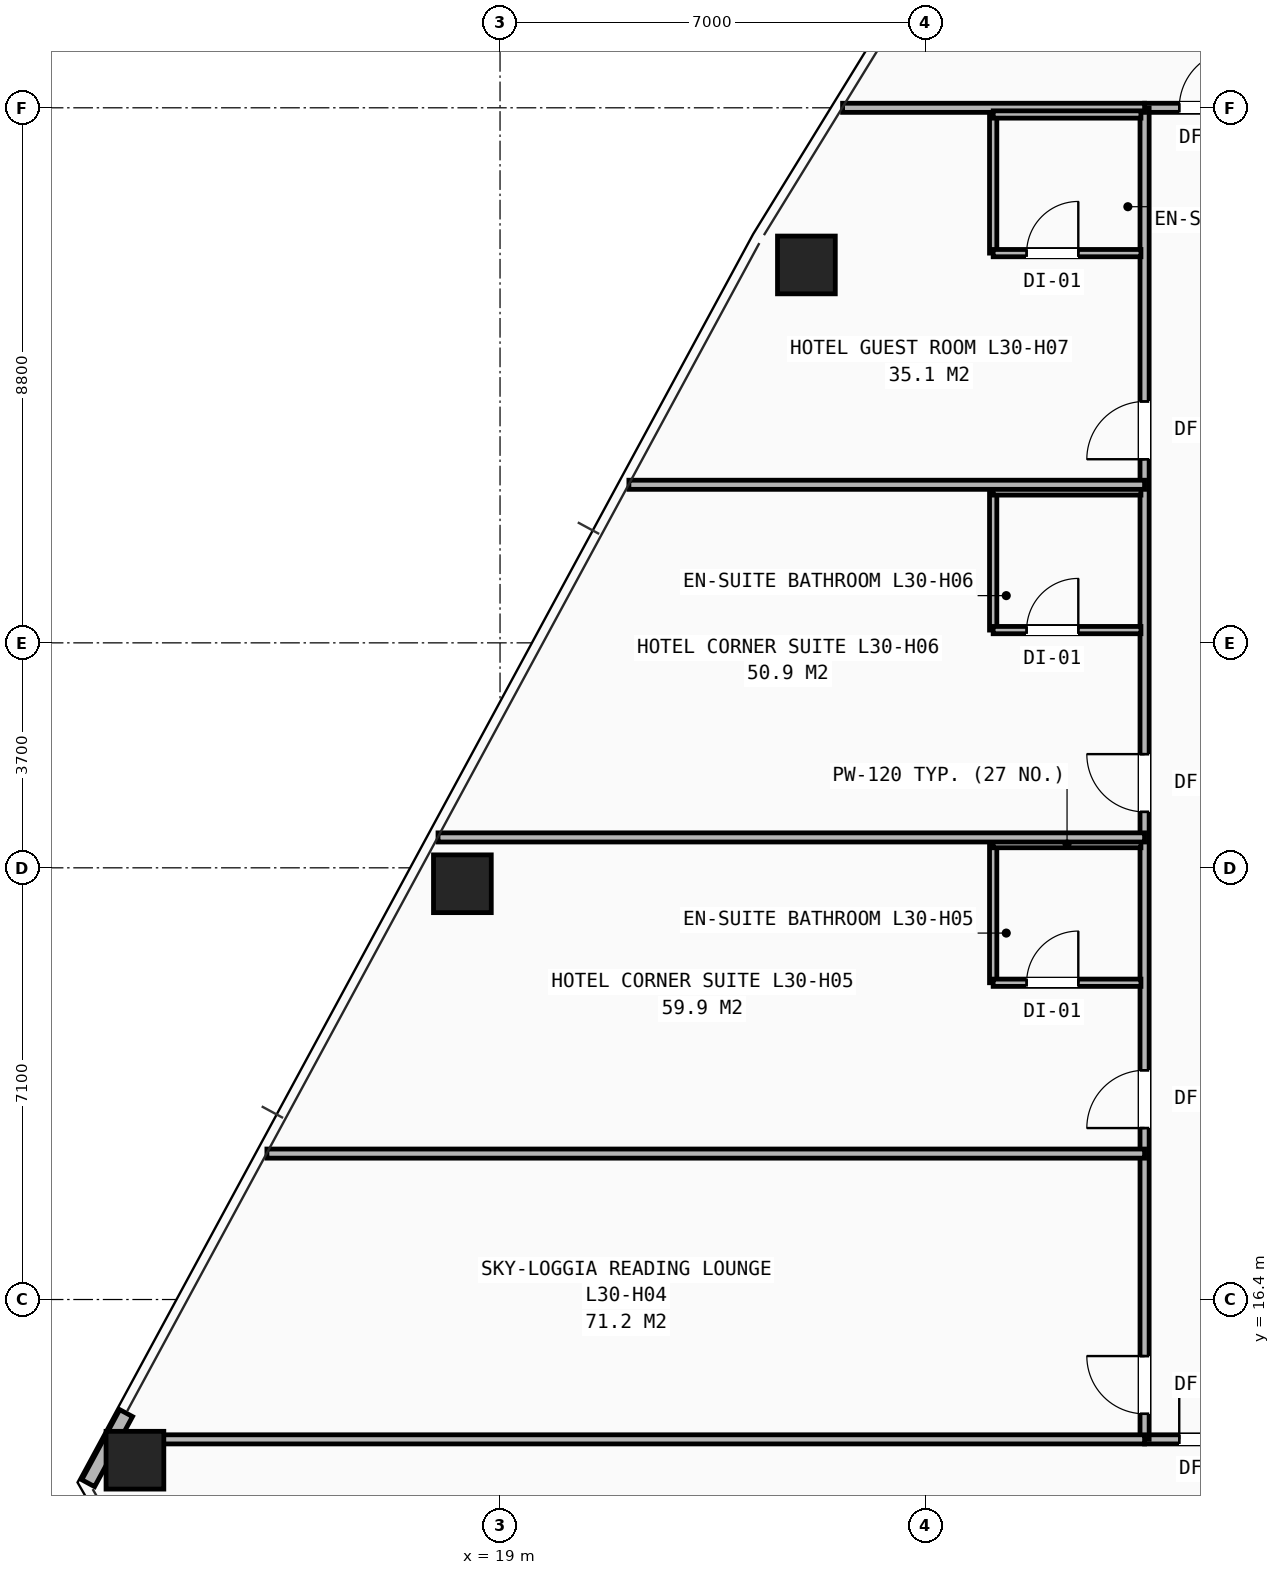
"""IFC4 building model, lengths in metres.
Left out: names, types, materials, properties, quantities, classifications, styles, units other than length and angle.
Written with IfcOpenShell. Run it as: python <this file> out.ifc"""

import sys

from ifc_helpers import new_model, si_unit, direction, frame, frame_2d, origin, origin_2d, place, context, subcontext, project, spatial, rectangle, hollow_rectangle, extrude, element, fill, save


model = new_model("IFC4")
c1 = context("Model", 3, precision=1e-05, world=origin(), true_north=direction((0.0, 1.0)))
c2 = subcontext(c1, "Body", "Model", "MODEL_VIEW")
j1 = project(units=[si_unit("LENGTHUNIT", "METRE"), si_unit("PLANEANGLEUNIT", "RADIAN")], contexts=[c1])
p1 = place(None, origin())
s1 = spatial("IfcSite", under=j1, at=p1, CompositionType="ELEMENT")
p2 = place(p1, origin())
s2 = spatial("IfcBuilding", under=s1, at=p2, CompositionType="ELEMENT")
p3 = place(p2, frame((0.0, 0.0, 105.4)))
s3 = spatial("IfcBuildingStorey", under=s2, at=p3, CompositionType="ELEMENT", Elevation=105.4)
for number, where, z_axis, x_axis in (
    (1, (24.038, 33.416, 0.0), (0.0, 0.0, 1.0), (1.0, 0.0, 0.0)),
    (2, (18.381, 23.238, 0.0), (0.0, 0.0, 1.0), (1.0, 0.0, 0.0)),
    (3, (12.996, 13.757, 0.0), (0.0, 0.0, 1.0), (1.0, 0.0, 0.0)),
):
    element("IfcColumn", number, at=place(p3, frame(where, z_axis=z_axis, x_axis=x_axis)), inside=s3, PredefinedType="COLUMN", context=c2, shape_type="SweptSolid", body=[
        extrude(hollow_rectangle(XDim=0.95, YDim=0.95, WallThickness=0.065, at=origin_2d()), origin(), (0.0, 0.0, 1.0), 3.2),
    ])
p4 = place(p3, frame((12.85, 14.532, 0.0), z_axis=(0.0, 0.0, 1.0), x_axis=(-0.475820948293, -0.879542167929, 0.0)))
e4 = element("IfcWall", 4, at=p4, inside=s3, PredefinedType="SHEAR", context=c2, shape_type="SweptSolid", body=[
    extrude(rectangle(XDim=1.311, YDim=0.24, at=frame_2d((0.655, 0.0))), origin(), (0.0, 0.0, 1.0), 2.253),
])
p5 = place(p3, frame((29.6, 14.1, 0.0), z_axis=(0.0, 0.0, 1.0), x_axis=(1.0, 0.0, 0.0)))
e5 = element("IfcWall", 5, at=p5, inside=s3, PredefinedType="PARTITIONING", context=c2, shape_type="SweptSolid", body=[
    extrude(rectangle(XDim=20.8, YDim=0.15, at=frame_2d((10.4, 0.0))), origin(), (0.0, 0.0, 1.0), 2.421),
])
p6 = place(p5, frame((0.57, 0.0, 0.0)))
e6 = element("IfcOpeningElement", 6, at=p6, cuts=e5, PredefinedType="OPENING", context=c2, shape_type="SweptSolid", body=[
    extrude(rectangle(XDim=0.95, YDim=2.1, at=frame_2d((0.475, 1.05))), frame((0.0, 0.085, 0.0), z_axis=(0.0, -1.0, 0.0), x_axis=(1.0, 0.0, 0.0)), (0.0, 0.0, 1.0), 0.17),
])
p7 = place(p5, frame((13.02, 0.0, 0.0)))
e7 = element("IfcOpeningElement", 7, at=p7, cuts=e5, PredefinedType="OPENING", context=c2, shape_type="SweptSolid", body=[
    extrude(rectangle(XDim=0.95, YDim=2.1, at=frame_2d((0.475, 1.05))), frame((0.0, 0.085, 0.0), z_axis=(0.0, -1.0, 0.0), x_axis=(1.0, 0.0, 0.0)), (0.0, 0.0, 1.0), 0.17),
])
p8 = place(p5, frame((17.42, 0.0, 0.0)))
e8 = element("IfcOpeningElement", 8, at=p8, cuts=e5, PredefinedType="OPENING", context=c2, shape_type="SweptSolid", body=[
    extrude(rectangle(XDim=0.95, YDim=2.1, at=frame_2d((0.475, 1.05))), frame((0.0, 0.085, 0.0), z_axis=(0.0, -1.0, 0.0), x_axis=(1.0, 0.0, 0.0)), (0.0, 0.0, 1.0), 0.17),
])
p9 = place(p3, frame((29.6, 36.0, 0.0), z_axis=(0.0, 0.0, 1.0), x_axis=(1.0, 0.0, 0.0)))
e9 = element("IfcWall", 9, at=p9, inside=s3, PredefinedType="PARTITIONING", context=c2, shape_type="SweptSolid", body=[
    extrude(rectangle(XDim=9.65, YDim=0.15, at=frame_2d((4.825, 0.0))), origin(), (0.0, 0.0, 1.0), 2.503),
])
p10 = place(p9, frame((0.57, 0.0, 0.0)))
e10 = element("IfcOpeningElement", 10, at=p10, cuts=e9, PredefinedType="OPENING", context=c2, shape_type="SweptSolid", body=[
    extrude(rectangle(XDim=0.95, YDim=2.1, at=frame_2d((0.475, 1.05))), frame((0.0, 0.085, 0.0), z_axis=(0.0, -1.0, 0.0), x_axis=(1.0, 0.0, 0.0)), (0.0, 0.0, 1.0), 0.17),
])
p11 = place(p9, frame((7.32, 0.0, 0.0)))
e11 = element("IfcOpeningElement", 11, at=p11, cuts=e9, PredefinedType="OPENING", context=c2, shape_type="SweptSolid", body=[
    extrude(rectangle(XDim=0.95, YDim=2.1, at=frame_2d((0.475, 1.05))), frame((0.0, 0.085, 0.0), z_axis=(0.0, -1.0, 0.0), x_axis=(1.0, 0.0, 0.0)), (0.0, 0.0, 1.0), 0.17),
])
p12 = place(p3, frame((29.6, 14.1, 0.0), z_axis=(0.0, 0.0, 1.0), x_axis=(0.0, 1.0, 0.0)))
e12 = element("IfcWall", 12, at=p12, inside=s3, PredefinedType="PARTITIONING", context=c2, shape_type="SweptSolid", body=[
    extrude(rectangle(XDim=21.9, YDim=0.15, at=frame_2d((10.95, 0.0))), origin(), (0.0, 0.0, 1.0), 2.421),
])
p13 = place(p12, frame((0.42, 0.0, 0.0)))
e13 = element("IfcOpeningElement", 13, at=p13, cuts=e12, PredefinedType="OPENING", context=c2, shape_type="SweptSolid", body=[
    extrude(rectangle(XDim=0.95, YDim=2.1, at=frame_2d((0.475, 1.05))), frame((0.0, 0.085, 0.0), z_axis=(0.0, -1.0, 0.0), x_axis=(1.0, 0.0, 0.0)), (0.0, 0.0, 1.0), 0.17),
])
p14 = place(p12, frame((5.12, 0.0, 0.0)))
e14 = element("IfcOpeningElement", 14, at=p14, cuts=e12, PredefinedType="OPENING", context=c2, shape_type="SweptSolid", body=[
    extrude(rectangle(XDim=0.95, YDim=2.1, at=frame_2d((0.475, 1.05))), frame((0.0, 0.085, 0.0), z_axis=(0.0, -1.0, 0.0), x_axis=(1.0, 0.0, 0.0)), (0.0, 0.0, 1.0), 0.17),
])
p15 = place(p12, frame((10.32, 0.0, 0.0)))
e15 = element("IfcOpeningElement", 15, at=p15, cuts=e12, PredefinedType="OPENING", context=c2, shape_type="SweptSolid", body=[
    extrude(rectangle(XDim=0.95, YDim=2.1, at=frame_2d((0.475, 1.05))), frame((0.0, 0.085, 0.0), z_axis=(0.0, -1.0, 0.0), x_axis=(1.0, 0.0, 0.0)), (0.0, 0.0, 1.0), 0.17),
])
p16 = place(p12, frame((16.12, 0.0, 0.0)))
e16 = element("IfcOpeningElement", 16, at=p16, cuts=e12, PredefinedType="OPENING", context=c2, shape_type="SweptSolid", body=[
    extrude(rectangle(XDim=0.95, YDim=2.1, at=frame_2d((0.475, 1.05))), frame((0.0, 0.085, 0.0), z_axis=(0.0, -1.0, 0.0), x_axis=(1.0, 0.0, 0.0)), (0.0, 0.0, 1.0), 0.17),
])
p17 = place(p3, frame((12.622, 14.1, 0.0), z_axis=(0.0, 0.0, 1.0), x_axis=(1.0, 0.0, 0.0)))
e17 = element("IfcWall", 17, at=p17, inside=s3, PredefinedType="PARTITIONING", context=c2, shape_type="SweptSolid", body=[
    extrude(rectangle(XDim=16.978, YDim=0.15, at=frame_2d((8.489, 0.0))), origin(), (0.0, 0.0, 1.0), 2.258),
])
p18 = place(p3, frame((24.633, 36.0, 0.0), z_axis=(0.0, 0.0, 1.0), x_axis=(1.0, 0.0, 0.0)))
e18 = element("IfcWall", 18, at=p18, inside=s3, PredefinedType="PARTITIONING", context=c2, shape_type="SweptSolid", body=[
    extrude(rectangle(XDim=4.967, YDim=0.15, at=frame_2d((2.483, 0.0))), origin(), (0.0, 0.0, 1.0), 2.258),
])
p19 = place(p3, frame((15.166, 18.8, 0.0), z_axis=(0.0, 0.0, 1.0), x_axis=(1.0, 0.0, 0.0)))
e19 = element("IfcWall", 19, at=p19, inside=s3, PredefinedType="PARTITIONING", context=c2, shape_type="SweptSolid", body=[
    extrude(rectangle(XDim=14.434, YDim=0.15, at=frame_2d((7.217, 0.0))), origin(), (0.0, 0.0, 1.0), 2.258),
])
p20 = place(p3, frame((27.11, 21.61, 0.0), z_axis=(0.0, 0.0, 1.0), x_axis=(0.0, 1.0, 0.0)))
e20 = element("IfcWall", 20, at=p20, inside=s3, PredefinedType="PARTITIONING", context=c2, shape_type="SweptSolid", body=[
    extrude(rectangle(XDim=2.28, YDim=0.12, at=frame_2d((1.14, 0.0))), origin(), (0.0, 0.0, 1.0), 2.97),
])
p21 = place(p3, frame((27.11, 21.61, 0.0), z_axis=(0.0, 0.0, 1.0), x_axis=(1.0, 0.0, 0.0)))
e21 = element("IfcWall", 21, at=p21, inside=s3, PredefinedType="PARTITIONING", context=c2, shape_type="SweptSolid", body=[
    extrude(rectangle(XDim=2.43, YDim=0.12, at=frame_2d((1.215, 0.0))), origin(), (0.0, 0.0, 1.0), 2.97),
])
p22 = place(p21, frame((0.55, 0.0, 0.0)))
e22 = element("IfcOpeningElement", 22, at=p22, cuts=e21, PredefinedType="OPENING", context=c2, shape_type="SweptSolid", body=[
    extrude(rectangle(XDim=0.85, YDim=2.05, at=frame_2d((0.425, 1.025))), frame((0.0, 0.07, 0.0), z_axis=(0.0, -1.0, 0.0), x_axis=(1.0, 0.0, 0.0)), (0.0, 0.0, 1.0), 0.14),
])
p23 = place(p3, frame((27.11, 23.89, 0.0), z_axis=(0.0, 0.0, 1.0), x_axis=(1.0, 0.0, 0.0)))
e23 = element("IfcWall", 23, at=p23, inside=s3, PredefinedType="PARTITIONING", context=c2, shape_type="SweptSolid", body=[
    extrude(rectangle(XDim=2.43, YDim=0.12, at=frame_2d((1.215, 0.0))), origin(), (0.0, 0.0, 1.0), 2.97),
])
p24 = place(p3, frame((17.98, 24.0, 0.0), z_axis=(0.0, 0.0, 1.0), x_axis=(1.0, 0.0, 0.0)))
e24 = element("IfcWall", 24, at=p24, inside=s3, PredefinedType="PARTITIONING", context=c2, shape_type="SweptSolid", body=[
    extrude(rectangle(XDim=11.62, YDim=0.15, at=frame_2d((5.81, 0.0))), origin(), (0.0, 0.0, 1.0), 2.258),
])
p25 = place(p3, frame((27.11, 27.41, 0.0), z_axis=(0.0, 0.0, 1.0), x_axis=(0.0, 1.0, 0.0)))
e25 = element("IfcWall", 25, at=p25, inside=s3, PredefinedType="PARTITIONING", context=c2, shape_type="SweptSolid", body=[
    extrude(rectangle(XDim=2.28, YDim=0.12, at=frame_2d((1.14, 0.0))), origin(), (0.0, 0.0, 1.0), 2.97),
])
p26 = place(p3, frame((27.11, 27.41, 0.0), z_axis=(0.0, 0.0, 1.0), x_axis=(1.0, 0.0, 0.0)))
e26 = element("IfcWall", 26, at=p26, inside=s3, PredefinedType="PARTITIONING", context=c2, shape_type="SweptSolid", body=[
    extrude(rectangle(XDim=2.43, YDim=0.12, at=frame_2d((1.215, 0.0))), origin(), (0.0, 0.0, 1.0), 2.97),
])
p27 = place(p26, frame((0.55, 0.0, 0.0)))
e27 = element("IfcOpeningElement", 27, at=p27, cuts=e26, PredefinedType="OPENING", context=c2, shape_type="SweptSolid", body=[
    extrude(rectangle(XDim=0.85, YDim=2.05, at=frame_2d((0.425, 1.025))), frame((0.0, 0.07, 0.0), z_axis=(0.0, -1.0, 0.0), x_axis=(1.0, 0.0, 0.0)), (0.0, 0.0, 1.0), 0.14),
])
p28 = place(p3, frame((27.11, 29.69, 0.0), z_axis=(0.0, 0.0, 1.0), x_axis=(1.0, 0.0, 0.0)))
e28 = element("IfcWall", 28, at=p28, inside=s3, PredefinedType="PARTITIONING", context=c2, shape_type="SweptSolid", body=[
    extrude(rectangle(XDim=2.43, YDim=0.12, at=frame_2d((1.215, 0.0))), origin(), (0.0, 0.0, 1.0), 2.97),
])
p29 = place(p3, frame((21.119, 29.8, 0.0), z_axis=(0.0, 0.0, 1.0), x_axis=(1.0, 0.0, 0.0)))
e29 = element("IfcWall", 29, at=p29, inside=s3, PredefinedType="PARTITIONING", context=c2, shape_type="SweptSolid", body=[
    extrude(rectangle(XDim=8.481, YDim=0.15, at=frame_2d((4.241, 0.0))), origin(), (0.0, 0.0, 1.0), 2.258),
])
p30 = place(p3, frame((27.11, 33.61, 0.0), z_axis=(0.0, 0.0, 1.0), x_axis=(0.0, 1.0, 0.0)))
e30 = element("IfcWall", 30, at=p30, inside=s3, PredefinedType="PARTITIONING", context=c2, shape_type="SweptSolid", body=[
    extrude(rectangle(XDim=2.28, YDim=0.12, at=frame_2d((1.14, 0.0))), origin(), (0.0, 0.0, 1.0), 2.97),
])
p31 = place(p3, frame((27.11, 33.61, 0.0), z_axis=(0.0, 0.0, 1.0), x_axis=(1.0, 0.0, 0.0)))
e31 = element("IfcWall", 31, at=p31, inside=s3, PredefinedType="PARTITIONING", context=c2, shape_type="SweptSolid", body=[
    extrude(rectangle(XDim=2.43, YDim=0.12, at=frame_2d((1.215, 0.0))), origin(), (0.0, 0.0, 1.0), 2.503),
])
p32 = place(p31, frame((0.55, 0.0, 0.0)))
e32 = element("IfcOpeningElement", 32, at=p32, cuts=e31, PredefinedType="OPENING", context=c2, shape_type="SweptSolid", body=[
    extrude(rectangle(XDim=0.85, YDim=2.05, at=frame_2d((0.425, 1.025))), frame((0.0, 0.07, 0.0), z_axis=(0.0, -1.0, 0.0), x_axis=(1.0, 0.0, 0.0)), (0.0, 0.0, 1.0), 0.14),
])
p33 = place(p3, frame((27.11, 35.89, 0.0), z_axis=(0.0, 0.0, 1.0), x_axis=(1.0, 0.0, 0.0)))
e33 = element("IfcWall", 33, at=p33, inside=s3, PredefinedType="PARTITIONING", context=c2, shape_type="SweptSolid", body=[
    extrude(rectangle(XDim=2.43, YDim=0.12, at=frame_2d((1.215, 0.0))), origin(), (0.0, 0.0, 1.0), 2.503),
])
p34 = place(p6, origin())
e34 = element("IfcDoor", 34, at=p34, inside=s3, OperationType="SINGLE_SWING_LEFT", PredefinedType="DOOR", context=c2, shape_type="SweptSolid", body=[
    extrude(rectangle(XDim=0.95, YDim=2.1, at=frame_2d((0.475, 1.05))), frame((0.0, 0.025, 0.0), z_axis=(0.0, -1.0, 0.0), x_axis=(1.0, 0.0, 0.0)), (0.0, 0.0, 1.0), 0.05),
])
fill(e6, e34)
p35 = place(p13, origin())
e35 = element("IfcDoor", 35, at=p35, inside=s3, OperationType="SINGLE_SWING_RIGHT", PredefinedType="DOOR", context=c2, shape_type="SweptSolid", body=[
    extrude(rectangle(XDim=0.95, YDim=2.1, at=frame_2d((0.475, 1.05))), frame((0.0, 0.025, 0.0), z_axis=(0.0, -1.0, 0.0), x_axis=(1.0, 0.0, 0.0)), (0.0, 0.0, 1.0), 0.05),
])
fill(e13, e35)
p36 = place(p14, origin())
e36 = element("IfcDoor", 36, at=p36, inside=s3, OperationType="SINGLE_SWING_LEFT", PredefinedType="DOOR", context=c2, shape_type="SweptSolid", body=[
    extrude(rectangle(XDim=0.95, YDim=2.1, at=frame_2d((0.475, 1.05))), frame((0.0, 0.025, 0.0), z_axis=(0.0, -1.0, 0.0), x_axis=(1.0, 0.0, 0.0)), (0.0, 0.0, 1.0), 0.05),
])
fill(e14, e36)
p37 = place(p22, origin())
e37 = element("IfcDoor", 37, at=p37, inside=s3, OperationType="SINGLE_SWING_RIGHT", PredefinedType="DOOR", context=c2, shape_type="SweptSolid", body=[
    extrude(rectangle(XDim=0.85, YDim=2.05, at=frame_2d((0.425, 1.025))), frame((0.0, 0.025, 0.0), z_axis=(0.0, -1.0, 0.0), x_axis=(1.0, 0.0, 0.0)), (0.0, 0.0, 1.0), 0.05),
])
fill(e22, e37)
p38 = place(p15, origin())
e38 = element("IfcDoor", 38, at=p38, inside=s3, OperationType="SINGLE_SWING_RIGHT", PredefinedType="DOOR", context=c2, shape_type="SweptSolid", body=[
    extrude(rectangle(XDim=0.95, YDim=2.1, at=frame_2d((0.475, 1.05))), frame((0.0, 0.025, 0.0), z_axis=(0.0, -1.0, 0.0), x_axis=(1.0, 0.0, 0.0)), (0.0, 0.0, 1.0), 0.05),
])
fill(e15, e38)
p39 = place(p27, origin())
e39 = element("IfcDoor", 39, at=p39, inside=s3, OperationType="SINGLE_SWING_RIGHT", PredefinedType="DOOR", context=c2, shape_type="SweptSolid", body=[
    extrude(rectangle(XDim=0.85, YDim=2.05, at=frame_2d((0.425, 1.025))), frame((0.0, 0.025, 0.0), z_axis=(0.0, -1.0, 0.0), x_axis=(1.0, 0.0, 0.0)), (0.0, 0.0, 1.0), 0.05),
])
fill(e27, e39)
p40 = place(p16, origin())
e40 = element("IfcDoor", 40, at=p40, inside=s3, OperationType="SINGLE_SWING_LEFT", PredefinedType="DOOR", context=c2, shape_type="SweptSolid", body=[
    extrude(rectangle(XDim=0.95, YDim=2.1, at=frame_2d((0.475, 1.05))), frame((0.0, 0.025, 0.0), z_axis=(0.0, -1.0, 0.0), x_axis=(1.0, 0.0, 0.0)), (0.0, 0.0, 1.0), 0.05),
])
fill(e16, e40)
p41 = place(p32, origin())
e41 = element("IfcDoor", 41, at=p41, inside=s3, OperationType="SINGLE_SWING_RIGHT", PredefinedType="DOOR", context=c2, shape_type="SweptSolid", body=[
    extrude(rectangle(XDim=0.85, YDim=2.05, at=frame_2d((0.425, 1.025))), frame((0.0, 0.025, 0.0), z_axis=(0.0, -1.0, 0.0), x_axis=(1.0, 0.0, 0.0)), (0.0, 0.0, 1.0), 0.05),
])
fill(e32, e41)
p42 = place(p10, origin())
e42 = element("IfcDoor", 42, at=p42, inside=s3, OperationType="SINGLE_SWING_RIGHT", PredefinedType="DOOR", context=c2, shape_type="SweptSolid", body=[
    extrude(rectangle(XDim=0.95, YDim=2.1, at=frame_2d((0.475, 1.05))), frame((0.0, 0.025, 0.0), z_axis=(0.0, -1.0, 0.0), x_axis=(1.0, 0.0, 0.0)), (0.0, 0.0, 1.0), 0.05),
])
fill(e10, e42)
save(model, sys.argv[1])
